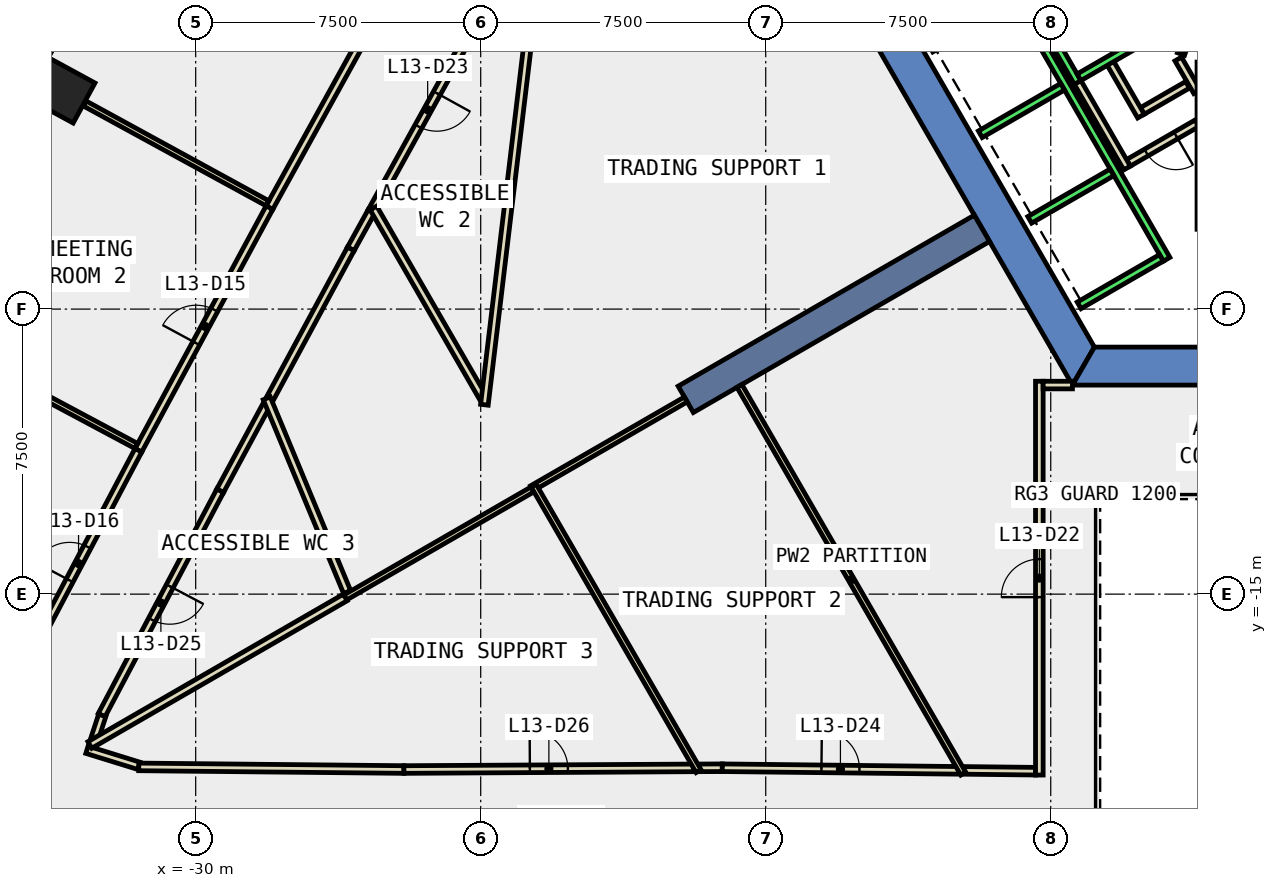
"""IFC4 building model, lengths in metres.
Left out: names, types, materials, properties, quantities, classifications, styles, units other than length and angle.
Written with IfcOpenShell. Run it as: python <this file> out.ifc"""

import sys

from ifc_helpers import new_model, si_unit, direction, frame, frame_2d, origin, origin_2d, place, context, subcontext, project, spatial, polyline, rectangle, outline, extrude, element, fill, save


model = new_model("IFC4")
c1 = context("Model", 3, precision=1e-05, world=origin(), true_north=direction((0.0, 1.0)))
c2 = subcontext(c1, "Body", "Model", "MODEL_VIEW")
j1 = project(units=[si_unit("LENGTHUNIT", "METRE"), si_unit("PLANEANGLEUNIT", "RADIAN")], contexts=[c1])
p1 = place(None, origin())
s1 = spatial("IfcSite", under=j1, at=p1, CompositionType="ELEMENT")
p2 = place(p1, origin())
s2 = spatial("IfcBuilding", under=s1, at=p2, CompositionType="ELEMENT")
p3 = place(p2, frame((0.0, 0.0, 64.4)))
s3 = spatial("IfcBuildingStorey", under=s2, at=p3, CompositionType="ELEMENT", Elevation=64.4)
p4 = place(p3, frame((-33.64, -1.695, -0.4), z_axis=(0.0, 0.0, 1.0), x_axis=(0.478140110514, 0.878283573066, 0.0)))
e1 = element("IfcColumn", 1, at=p4, inside=s3, PredefinedType="COLUMN", context=c2, shape_type="SweptSolid", body=[
    extrude(rectangle(XDim=1.2, YDim=1.6, at=origin_2d()), origin(), (0.0, 0.0, 1.0), 4.2),
])
p5 = place(p3, frame((0.0, 0.0, -0.4)))
e2 = element("IfcWall", 2, at=p5, inside=s3, PredefinedType="SHEAR", context=c2, shape_type="SweptSolid", body=[
    extrude(outline(polyline([(-13.856, 2.5), (-6.928, -9.5), (-6.351, -8.5), (-12.702, 2.5), (-13.856, 2.5)])), origin(), (0.0, 0.0, 1.0), 4.2),
])
p6 = place(p3, frame((0.0, 0.0, -0.4)))
e3 = element("IfcWall", 3, at=p6, inside=s3, PredefinedType="SHEAR", context=c2, shape_type="SweptSolid", body=[
    extrude(outline(polyline([(3.75, -9.5), (3.75, -8.5), (-6.351, -8.5), (-6.928, -9.5), (3.75, -9.5)])), origin(), (0.0, 0.0, 1.0), 4.2),
])
p7 = place(p3, frame((-9.31, -5.375, -0.4), z_axis=(0.0, 0.0, 1.0), x_axis=(-0.866017533419, -0.500013631625, 0.0)))
e4 = element("IfcWall", 4, at=p7, inside=s3, PredefinedType="SHEAR", context=c2, shape_type="SweptSolid", body=[
    extrude(rectangle(XDim=9.0, YDim=0.8, at=frame_2d((4.5, 0.0))), origin(), (0.0, 0.0, 1.0), 4.2),
])
p8 = place(p3, frame((-31.047, 4.549, 0.0), z_axis=(0.0, 0.0, 1.0), x_axis=(-0.483587271547, -0.875296150339, 0.0)))
e5 = element("IfcWall", 5, at=p8, inside=s3, PredefinedType="STANDARD", context=c2, shape_type="SweptSolid", body=[
    extrude(rectangle(XDim=6.125, YDim=0.3, at=frame_2d((3.062, 0.0))), origin(), (0.0, 0.0, 1.0), 3.8),
])
p9 = place(p8, frame((0.531, 0.0, 0.9)))
e6 = element("IfcOpeningElement", 6, at=p9, cuts=e5, PredefinedType="OPENING", context=c2, shape_type="SweptSolid", body=[
    extrude(rectangle(XDim=2.0, YDim=2.6, at=frame_2d((1.0, 1.3))), frame((0.0, 0.16, 0.0), z_axis=(0.0, -1.0, 0.0), x_axis=(1.0, 0.0, 0.0)), (0.0, 0.0, 1.0), 0.32),
])
p10 = place(p8, frame((3.594, 0.0, 0.9)))
e7 = element("IfcOpeningElement", 7, at=p10, cuts=e5, PredefinedType="OPENING", context=c2, shape_type="SweptSolid", body=[
    extrude(rectangle(XDim=2.0, YDim=2.6, at=frame_2d((1.0, 1.3))), frame((0.0, 0.16, 0.0), z_axis=(0.0, -1.0, 0.0), x_axis=(1.0, 0.0, 0.0)), (0.0, 0.0, 1.0), 0.32),
])
p11 = place(p3, frame((-25.371, -4.927, 0.0), z_axis=(0.0, 0.0, 1.0), x_axis=(-0.483899488004, -0.875123582993, 0.0)))
e8 = element("IfcWall", 8, at=p11, inside=s3, PredefinedType="PARTITIONING", context=c2, shape_type="SweptSolid", body=[
    extrude(rectangle(XDim=1.13, YDim=0.2, at=frame_2d((0.565, 0.0))), origin(), (0.0, 0.0, 1.0), 3.8),
])
p12 = place(p3, frame((-25.918, -5.916, 0.0), z_axis=(0.0, 0.0, 1.0), x_axis=(-0.4752384902, -0.879857021016, 0.0)))
e9 = element("IfcWall", 9, at=p12, inside=s3, PredefinedType="PARTITIONING", context=c2, shape_type="SweptSolid", body=[
    extrude(rectangle(XDim=4.473, YDim=0.2, at=frame_2d((2.237, 0.0))), origin(), (0.0, 0.0, 1.0), 3.8),
])
p13 = place(p3, frame((-9.776, -19.638, 0.0), z_axis=(0.0, 0.0, 1.0), x_axis=(0.999937374473, -0.011191386544, 0.0)))
e10 = element("IfcWall", 10, at=p13, inside=s3, PredefinedType="PARTITIONING", context=c2, shape_type="SweptSolid", body=[
    extrude(rectangle(XDim=1.876, YDim=0.2, at=frame_2d((0.938, 0.0))), origin(), (0.0, 0.0, 1.0), 3.8),
])
p14 = place(p3, frame((-22.42, 0.415, 0.0), z_axis=(0.0, 0.0, 1.0), x_axis=(-0.483559496818, -0.875311494861, 0.0)))
e11 = element("IfcWall", 11, at=p14, inside=s3, PredefinedType="PARTITIONING", context=c2, shape_type="SweptSolid", body=[
    extrude(rectangle(XDim=6.103, YDim=0.2, at=frame_2d((3.052, 0.0))), origin(), (0.0, 0.0, 1.0), 3.8),
])
p15 = place(p14, frame((2.552, 0.0, 0.0)))
e12 = element("IfcOpeningElement", 12, at=p15, cuts=e11, PredefinedType="OPENING", context=c2, shape_type="SweptSolid", body=[
    extrude(rectangle(XDim=1.0, YDim=2.1, at=frame_2d((0.5, 1.05))), frame((0.0, 0.11, 0.0), z_axis=(0.0, -1.0, 0.0), x_axis=(1.0, 0.0, 0.0)), (0.0, 0.0, 1.0), 0.22),
])
p16 = place(p3, frame((-16.742, -19.571, 0.0), z_axis=(0.0, 0.0, 1.0), x_axis=(0.999988034534, 0.004891910483, 0.0)))
e13 = element("IfcWall", 13, at=p16, inside=s3, PredefinedType="PARTITIONING", context=c2, shape_type="SweptSolid", body=[
    extrude(rectangle(XDim=0.599, YDim=0.2, at=frame_2d((0.299, 0.0))), origin(), (0.0, 0.0, 1.0), 3.8),
])
p17 = place(p3, frame((-16.143, -19.568, 0.0), z_axis=(0.0, 0.0, 1.0), x_axis=(0.999938688645, -0.011073344206, 0.0)))
e14 = element("IfcWall", 14, at=p17, inside=s3, PredefinedType="PARTITIONING", context=c2, shape_type="SweptSolid", body=[
    extrude(rectangle(XDim=6.218, YDim=0.2, at=frame_2d((3.109, 0.0))), origin(), (0.0, 0.0, 1.0), 3.8),
])
p18 = place(p17, frame((2.609, 0.0, 0.0)))
e15 = element("IfcOpeningElement", 15, at=p18, cuts=e14, PredefinedType="OPENING", context=c2, shape_type="SweptSolid", body=[
    extrude(rectangle(XDim=1.0, YDim=2.1, at=frame_2d((0.5, 1.05))), frame((0.0, 0.11, 0.0), z_axis=(0.0, -1.0, 0.0), x_axis=(1.0, 0.0, 0.0)), (0.0, 0.0, 1.0), 0.22),
])
p19 = place(p3, frame((-28.139, -10.028, 0.0), z_axis=(0.0, 0.0, 1.0), x_axis=(-0.475287687013, -0.879830446491, 0.0)))
e16 = element("IfcWall", 16, at=p19, inside=s3, PredefinedType="PARTITIONING", context=c2, shape_type="SweptSolid", body=[
    extrude(rectangle(XDim=2.561, YDim=0.2, at=frame_2d((1.28, 0.0))), origin(), (0.0, 0.0, 1.0), 3.8),
])
p20 = place(p3, frame((-29.356, -12.281, 0.0), z_axis=(0.0, 0.0, 1.0), x_axis=(-0.467123190417, -0.884192244353, 0.0)))
e17 = element("IfcWall", 17, at=p20, inside=s3, PredefinedType="PARTITIONING", context=c2, shape_type="SweptSolid", body=[
    extrude(rectangle(XDim=6.677, YDim=0.2, at=frame_2d((3.339, 0.0))), origin(), (0.0, 0.0, 1.0), 3.8),
])
p21 = place(p20, frame((2.839, 0.0, 0.0)))
e18 = element("IfcOpeningElement", 18, at=p21, cuts=e17, PredefinedType="OPENING", context=c2, shape_type="SweptSolid", body=[
    extrude(rectangle(XDim=1.0, YDim=2.1, at=frame_2d((0.5, 1.05))), frame((0.0, 0.11, 0.0), z_axis=(0.0, -1.0, 0.0), x_axis=(1.0, 0.0, 0.0)), (0.0, 0.0, 1.0), 0.22),
])
p22 = place(p3, frame((-32.459, -18.191, 0.0), z_axis=(0.0, 0.0, 1.0), x_axis=(-0.312158013001, -0.950030196846, 0.0)))
e19 = element("IfcWall", 19, at=p22, inside=s3, PredefinedType="PARTITIONING", context=c2, shape_type="SweptSolid", body=[
    extrude(rectangle(XDim=0.666, YDim=0.2, at=frame_2d((0.333, 0.0))), origin(), (0.0, 0.0, 1.0), 3.8),
])
p23 = place(p3, frame((-32.861, -19.095, 0.0), z_axis=(0.0, 0.0, 1.0), x_axis=(0.955301951006, -0.29563183591, 0.0)))
e20 = element("IfcWall", 20, at=p23, inside=s3, PredefinedType="PARTITIONING", context=c2, shape_type="SweptSolid", body=[
    extrude(rectangle(XDim=1.431, YDim=0.2, at=frame_2d((0.716, 0.0))), origin(), (0.0, 0.0, 1.0), 3.8),
])
p24 = place(p3, frame((-31.498, -19.546, 0.0), z_axis=(0.0, 0.0, 1.0), x_axis=(0.999950985372, -0.009900851195, 0.0)))
e21 = element("IfcWall", 21, at=p24, inside=s3, PredefinedType="PARTITIONING", context=c2, shape_type="SweptSolid", body=[
    extrude(rectangle(XDim=6.978, YDim=0.2, at=frame_2d((3.489, 0.0))), origin(), (0.0, 0.0, 1.0), 3.8),
])
p25 = place(p3, frame((-24.52, -19.615, 0.0), z_axis=(0.0, 0.0, 1.0), x_axis=(0.999984134574, 0.00563299218, 0.0)))
e22 = element("IfcWall", 22, at=p25, inside=s3, PredefinedType="PARTITIONING", context=c2, shape_type="SweptSolid", body=[
    extrude(rectangle(XDim=7.628, YDim=0.2, at=frame_2d((3.814, 0.0))), origin(), (0.0, 0.0, 1.0), 3.8),
])
p26 = place(p25, frame((3.314, 0.0, 0.0)))
e23 = element("IfcOpeningElement", 23, at=p26, cuts=e22, PredefinedType="OPENING", context=c2, shape_type="SweptSolid", body=[
    extrude(rectangle(XDim=1.0, YDim=2.1, at=frame_2d((0.5, 1.05))), frame((0.0, 0.11, 0.0), z_axis=(0.0, -1.0, 0.0), x_axis=(1.0, 0.0, 0.0)), (0.0, 0.0, 1.0), 0.22),
])
p27 = place(p3, frame((-28.06, -4.831, 0.0), z_axis=(0.0, 0.0, 1.0), x_axis=(0.483631054848, 0.875271959328, 0.0)))
e24 = element("IfcWall", 24, at=p27, inside=s3, PredefinedType="PARTITIONING", context=c2, shape_type="SweptSolid", body=[
    extrude(rectangle(XDim=7.33, YDim=0.2, at=frame_2d((3.665, 0.0))), origin(), (0.0, 0.0, 1.0), 3.8),
])
p28 = place(p3, frame((-31.509, -11.216, 0.0), z_axis=(0.0, 0.0, 1.0), x_axis=(0.475367159168, 0.879787510701, 0.0)))
e25 = element("IfcWall", 25, at=p28, inside=s3, PredefinedType="PARTITIONING", context=c2, shape_type="SweptSolid", body=[
    extrude(rectangle(XDim=7.257, YDim=0.2, at=frame_2d((3.629, 0.0))), origin(), (0.0, 0.0, 1.0), 3.8),
])
p29 = place(p28, frame((3.203, 0.0, 0.0)))
e26 = element("IfcOpeningElement", 26, at=p29, cuts=e25, PredefinedType="OPENING", context=c2, shape_type="SweptSolid", body=[
    extrude(rectangle(XDim=1.0, YDim=2.1, at=frame_2d((0.5, 1.05))), frame((0.0, 0.11, 0.0), z_axis=(0.0, -1.0, 0.0), x_axis=(1.0, 0.0, 0.0)), (0.0, 0.0, 1.0), 0.22),
])
p30 = place(p3, frame((-34.692, -17.243, 0.0), z_axis=(0.0, 0.0, 1.0), x_axis=(0.467102540817, 0.884203153332, 0.0)))
e27 = element("IfcWall", 27, at=p30, inside=s3, PredefinedType="PARTITIONING", context=c2, shape_type="SweptSolid", body=[
    extrude(rectangle(XDim=6.816, YDim=0.2, at=frame_2d((3.408, 0.0))), origin(), (0.0, 0.0, 1.0), 3.8),
])
p31 = place(p30, frame((2.946, 0.0, 0.0)))
e28 = element("IfcOpeningElement", 28, at=p31, cuts=e27, PredefinedType="OPENING", context=c2, shape_type="SweptSolid", body=[
    extrude(rectangle(XDim=1.0, YDim=2.1, at=frame_2d((0.5, 1.05))), frame((0.0, 0.11, 0.0), z_axis=(0.0, -1.0, 0.0), x_axis=(1.0, 0.0, 0.0)), (0.0, 0.0, 1.0), 0.22),
])
p32 = place(p3, frame((-3.9, -1.599, 0.0), z_axis=(0.0, 0.0, 1.0), x_axis=(-0.865969445389, -0.500096910261, 0.0)))
e29 = element("IfcWall", 29, at=p32, inside=s3, PredefinedType="PARTITIONING", context=c2, shape_type="SweptSolid", body=[
    extrude(rectangle(XDim=1.373, YDim=0.2, at=frame_2d((0.687, 0.0))), origin(), (0.0, 0.0, 1.0), 3.8),
])
p33 = place(p3, frame((-5.126, -2.422, 0.0), z_axis=(0.0, 0.0, 1.0), x_axis=(-0.500062241894, 0.865989465428, 0.0)))
e30 = element("IfcWall", 30, at=p33, inside=s3, PredefinedType="PARTITIONING", context=c2, shape_type="SweptSolid", body=[
    extrude(rectangle(XDim=1.7, YDim=0.2, at=frame_2d((0.85, 0.0))), origin(), (0.0, 0.0, 1.0), 3.8),
])
p34 = place(p3, frame((-3.65, -2.61, 0.0), z_axis=(0.0, 0.0, 1.0), x_axis=(-0.866072462134, -0.499918483688, 0.0)))
e31 = element("IfcWall", 31, at=p34, inside=s3, PredefinedType="PARTITIONING", context=c2, shape_type="SweptSolid", body=[
    extrude(rectangle(XDim=2.084, YDim=0.2, at=frame_2d((1.042, 0.0))), origin(), (0.0, 0.0, 1.0), 3.8),
])
p35 = place(p34, frame((0.642, 0.0, 0.0)))
e32 = element("IfcOpeningElement", 32, at=p35, cuts=e31, PredefinedType="OPENING", context=c2, shape_type="SweptSolid", body=[
    extrude(rectangle(XDim=0.9, YDim=2.1, at=frame_2d((0.45, 1.05))), frame((0.0, 0.11, 0.0), z_axis=(0.0, -1.0, 0.0), x_axis=(1.0, 0.0, 0.0)), (0.0, 0.0, 1.0), 0.22),
])
p36 = place(p3, frame((-5.492, -3.788, 0.0), z_axis=(0.0, 0.0, 1.0), x_axis=(-0.500008949224, 0.866020236886, 0.0)))
e33 = element("IfcWall", 33, at=p36, inside=s3, PredefinedType="PARTITIONING", context=c2, shape_type="SweptSolid", body=[
    extrude(rectangle(XDim=2.68, YDim=0.2, at=frame_2d((1.34, 0.0))), origin(), (0.0, 0.0, 1.0), 3.8),
])
p37 = place(p3, frame((-4.145, -0.92, 0.0), z_axis=(0.0, 0.0, 1.0), x_axis=(0.499743786207, -0.866173278362, 0.0)))
e34 = element("IfcWall", 34, at=p37, inside=s3, PredefinedType="PARTITIONING", context=c2, shape_type="SweptSolid", body=[
    extrude(rectangle(XDim=0.991, YDim=0.2, at=frame_2d((0.495, 0.0))), origin(), (0.0, 0.0, 1.0), 3.8),
])
p38 = place(p3, frame((-3.96, -0.47, 0.0), z_axis=(0.0, 0.0, 1.0), x_axis=(-0.334824194261, -0.942280615813, 0.0)))
e35 = element("IfcWall", 35, at=p38, inside=s3, PredefinedType="PARTITIONING", context=c2, shape_type="SweptSolid", body=[
    extrude(rectangle(XDim=0.338, YDim=0.2, at=frame_2d((0.169, 0.0))), origin(), (0.0, 0.0, 1.0), 3.8),
])
p39 = place(p3, frame((-7.8, -19.76, 0.0), z_axis=(0.0, 0.0, 1.0), x_axis=(0.0, 1.0, 0.0)))
e36 = element("IfcWall", 36, at=p39, inside=s3, PredefinedType="PARTITIONING", context=c2, shape_type="SweptSolid", body=[
    extrude(rectangle(XDim=10.361, YDim=0.2, at=frame_2d((5.181, 0.0))), origin(), (0.0, 0.0, 1.0), 3.8),
])
p40 = place(p39, frame((4.681, 0.0, 0.0)))
e37 = element("IfcOpeningElement", 37, at=p40, cuts=e36, PredefinedType="OPENING", context=c2, shape_type="SweptSolid", body=[
    extrude(rectangle(XDim=1.0, YDim=2.1, at=frame_2d((0.5, 1.05))), frame((0.0, 0.11, 0.0), z_axis=(0.0, -1.0, 0.0), x_axis=(1.0, 0.0, 0.0)), (0.0, 0.0, 1.0), 0.22),
])
p41 = place(p3, frame((-7.7, -9.499, 0.0), z_axis=(0.0, 0.0, 1.0), x_axis=(1.0, 0.0, 0.0)))
e38 = element("IfcWall", 38, at=p41, inside=s3, PredefinedType="PARTITIONING", context=c2, shape_type="SweptSolid", body=[
    extrude(rectangle(XDim=0.771, YDim=0.2, at=frame_2d((0.385, 0.0))), origin(), (0.0, 0.0, 1.0), 3.8),
])
p42 = place(p3, frame((-25.323, -4.84, 0.0), z_axis=(0.0, 0.0, 1.0), x_axis=(0.500070797646, -0.865984524886, 0.0)))
e39 = element("IfcWall", 39, at=p42, inside=s3, PredefinedType="PARTITIONING", context=c2, shape_type="SweptSolid", body=[
    extrude(rectangle(XDim=5.763, YDim=0.2, at=frame_2d((2.882, 0.0))), origin(), (0.0, 0.0, 1.0), 3.8),
])
p43 = place(p3, frame((-22.403, -10.017, 0.0), z_axis=(0.0, 0.0, 1.0), x_axis=(0.119143334217, 0.992877064853, 0.0)))
e40 = element("IfcWall", 40, at=p43, inside=s3, PredefinedType="PARTITIONING", context=c2, shape_type="SweptSolid", body=[
    extrude(rectangle(XDim=10.207, YDim=0.2, at=frame_2d((5.104, 0.0))), origin(), (0.0, 0.0, 1.0), 3.8),
])
p44 = place(p3, frame((-9.801, -19.724, 0.0), z_axis=(0.0, 0.0, 1.0), x_axis=(-0.500005867738, 0.866022016018, 0.0)))
e41 = element("IfcWall", 41, at=p44, inside=s3, PredefinedType="PARTITIONING", context=c2, shape_type="SweptSolid", body=[
    extrude(rectangle(XDim=11.781, YDim=0.15, at=frame_2d((5.891, 0.0))), origin(), (0.0, 0.0, 1.0), 3.8),
])
p45 = place(p3, frame((-17.103, -9.878, 0.0), z_axis=(0.0, 0.0, 1.0), x_axis=(-0.866013358989, -0.500020861617, 0.0)))
e42 = element("IfcWall", 42, at=p45, inside=s3, PredefinedType="PARTITIONING", context=c2, shape_type="SweptSolid", body=[
    extrude(rectangle(XDim=4.674, YDim=0.15, at=frame_2d((2.337, 0.0))), origin(), (0.0, 0.0, 1.0), 3.8),
])
p46 = place(p3, frame((-26.015, -14.946, 0.0), z_axis=(0.0, 0.0, 1.0), x_axis=(-0.383189005855, 0.923669955012, 0.0)))
e43 = element("IfcWall", 43, at=p46, inside=s3, PredefinedType="PARTITIONING", context=c2, shape_type="SweptSolid", body=[
    extrude(rectangle(XDim=5.52, YDim=0.2, at=frame_2d((2.76, 0.0))), origin(), (0.0, 0.0, 1.0), 3.8),
])
p47 = place(p3, frame((-21.135, -12.243, 0.0), z_axis=(0.0, 0.0, 1.0), x_axis=(-0.866083439347, -0.499899465982, 0.0)))
e44 = element("IfcWall", 44, at=p47, inside=s3, PredefinedType="PARTITIONING", context=c2, shape_type="SweptSolid", body=[
    extrude(rectangle(XDim=5.691, YDim=0.15, at=frame_2d((2.846, 0.0))), origin(), (0.0, 0.0, 1.0), 3.8),
])
p48 = place(p3, frame((-16.767, -19.658, 0.0), z_axis=(0.0, 0.0, 1.0), x_axis=(-0.500083586486, 0.865977139726, 0.0)))
e45 = element("IfcWall", 45, at=p48, inside=s3, PredefinedType="PARTITIONING", context=c2, shape_type="SweptSolid", body=[
    extrude(rectangle(XDim=8.68, YDim=0.15, at=frame_2d((4.34, 0.0))), origin(), (0.0, 0.0, 1.0), 3.8),
])
p49 = place(p3, frame((-26.064, -15.088, 0.0), z_axis=(0.0, 0.0, 1.0), x_axis=(-0.865982841629, -0.500073712571, 0.0)))
e46 = element("IfcWall", 46, at=p49, inside=s3, PredefinedType="PARTITIONING", context=c2, shape_type="SweptSolid", body=[
    extrude(rectangle(XDim=7.761, YDim=0.2, at=frame_2d((3.88, 0.0))), origin(), (0.0, 0.0, 1.0), 3.8),
])
p50 = place(p3, frame((-28.111, -4.717, 0.0), z_axis=(0.0, 0.0, 1.0), x_axis=(-0.877558297547, 0.479469951515, 0.0)))
e47 = element("IfcWall", 47, at=p50, inside=s3, PredefinedType="PARTITIONING", context=c2, shape_type="SweptSolid", body=[
    extrude(rectangle(XDim=5.481, YDim=0.15, at=frame_2d((2.74, 0.0))), origin(), (0.0, 0.0, 1.0), 3.8),
])
p51 = place(p3, frame((-31.561, -11.103, 0.0), z_axis=(0.0, 0.0, 1.0), x_axis=(-0.882056805494, 0.47114306944, 0.0)))
e48 = element("IfcWall", 48, at=p51, inside=s3, PredefinedType="PARTITIONING", context=c2, shape_type="SweptSolid", body=[
    extrude(rectangle(XDim=5.48, YDim=0.15, at=frame_2d((2.74, 0.0))), origin(), (0.0, 0.0, 1.0), 3.8),
])
p52 = place(p3, frame((-8.192, 0.888, 0.0), z_axis=(0.0, 0.0, 1.0), x_axis=(0.49994636267, -0.866056369097, 0.0)))
e49 = element("IfcWall", 49, at=p52, inside=s3, PredefinedType="STANDARD", context=c2, shape_type="SweptSolid", body=[
    extrude(rectangle(XDim=2.8, YDim=0.2, at=frame_2d((1.4, 0.0))), origin(), (0.0, 0.0, 1.0), 3.8),
])
p53 = place(p3, frame((-4.677, -0.2, 0.0), z_axis=(0.0, 0.0, 1.0), x_axis=(-0.865973769406, -0.500089422704, 0.0)))
e50 = element("IfcWall", 50, at=p53, inside=s3, PredefinedType="STANDARD", context=c2, shape_type="SweptSolid", body=[
    extrude(rectangle(XDim=2.399, YDim=0.2, at=frame_2d((1.2, 0.0))), origin(), (0.0, 0.0, 1.0), 3.8),
])
p54 = place(p3, frame((-9.751, 2.99, 0.0), z_axis=(0.0, 0.0, 1.0), x_axis=(0.50000090737, -0.866024879913, 0.0)))
e51 = element("IfcWall", 51, at=p54, inside=s3, PredefinedType="STANDARD", context=c2, shape_type="SweptSolid", body=[
    extrude(rectangle(XDim=10.6, YDim=0.2, at=frame_2d((5.3, 0.0))), origin(), (0.0, 0.0, 1.0), 3.8),
])
for number, where, z_axis, x_axis in (
    (52, (-7.188, -1.65, 0.0), (0.0, 0.0, 1.0), (-0.866, -0.5, 0.0)),
    (53, (-5.888, -3.902, 0.0), (0.0, 0.0, 1.0), (-0.866, -0.5, 0.0)),
    (54, (-4.588, -6.153, 0.0), (0.0, 0.0, 1.0), (-0.866, -0.5, 0.0)),
):
    element("IfcWall", number, at=place(p3, frame(where, z_axis=z_axis, x_axis=x_axis)), inside=s3, PredefinedType="STANDARD", context=c2, shape_type="SweptSolid", body=[
        extrude(rectangle(XDim=2.5, YDim=0.2, at=frame_2d((1.25, 0.0))), origin(), (0.0, 0.0, 1.0), 3.8),
    ])
p55 = place(p3, frame((-3.55, -1.0, 0.0), z_axis=(0.0, 0.0, 1.0), x_axis=(0.0, -1.0, 0.0)))
e55 = element("IfcWall", 55, at=p55, inside=s3, PredefinedType="STANDARD", context=c2, shape_type="SweptSolid", body=[
    extrude(rectangle(XDim=4.4, YDim=0.2, at=frame_2d((2.2, 0.0))), origin(), (0.0, 0.0, 1.0), 3.8),
])
p56 = place(p55, frame((1.65, 0.0, 0.0)))
e56 = element("IfcOpeningElement", 56, at=p56, cuts=e55, PredefinedType="OPENING", context=c2, shape_type="SweptSolid", body=[
    extrude(rectangle(XDim=1.1, YDim=2.2, at=frame_2d((0.55, 1.1))), frame((0.0, 0.11, 0.0), z_axis=(0.0, -1.0, 0.0), x_axis=(1.0, 0.0, 0.0)), (0.0, 0.0, 1.0), 0.22),
])
p57 = place(p29, origin())
e57 = element("IfcDoor", 57, at=p57, inside=s3, OperationType="SINGLE_SWING_RIGHT", PredefinedType="DOOR", context=c2, shape_type="SweptSolid", body=[
    extrude(rectangle(XDim=1.0, YDim=2.1, at=frame_2d((0.5, 1.05))), frame((0.0, 0.025, 0.0), z_axis=(0.0, -1.0, 0.0), x_axis=(1.0, 0.0, 0.0)), (0.0, 0.0, 1.0), 0.05),
])
fill(e26, e57)
p58 = place(p31, origin())
e58 = element("IfcDoor", 58, at=p58, inside=s3, OperationType="SINGLE_SWING_LEFT", PredefinedType="DOOR", context=c2, shape_type="SweptSolid", body=[
    extrude(rectangle(XDim=1.0, YDim=2.1, at=frame_2d((0.5, 1.05))), frame((0.0, 0.025, 0.0), z_axis=(0.0, -1.0, 0.0), x_axis=(1.0, 0.0, 0.0)), (0.0, 0.0, 1.0), 0.05),
])
fill(e28, e58)
p59 = place(p40, origin())
e59 = element("IfcDoor", 59, at=p59, inside=s3, OperationType="SINGLE_SWING_LEFT", PredefinedType="DOOR", context=c2, shape_type="SweptSolid", body=[
    extrude(rectangle(XDim=1.0, YDim=2.1, at=frame_2d((0.5, 1.05))), frame((0.0, 0.025, 0.0), z_axis=(0.0, -1.0, 0.0), x_axis=(1.0, 0.0, 0.0)), (0.0, 0.0, 1.0), 0.05),
])
fill(e37, e59)
p60 = place(p15, origin())
e60 = element("IfcDoor", 60, at=p60, inside=s3, OperationType="SINGLE_SWING_LEFT", PredefinedType="DOOR", context=c2, shape_type="SweptSolid", body=[
    extrude(rectangle(XDim=1.0, YDim=2.1, at=frame_2d((0.5, 1.05))), frame((0.0, 0.025, 0.0), z_axis=(0.0, -1.0, 0.0), x_axis=(1.0, 0.0, 0.0)), (0.0, 0.0, 1.0), 0.05),
])
fill(e12, e60)
p61 = place(p18, origin())
e61 = element("IfcDoor", 61, at=p61, inside=s3, OperationType="SINGLE_SWING_LEFT", PredefinedType="DOOR", context=c2, shape_type="SweptSolid", body=[
    extrude(rectangle(XDim=1.0, YDim=2.1, at=frame_2d((0.5, 1.05))), frame((0.0, 0.025, 0.0), z_axis=(0.0, -1.0, 0.0), x_axis=(1.0, 0.0, 0.0)), (0.0, 0.0, 1.0), 0.05),
])
fill(e15, e61)
p62 = place(p21, origin())
e62 = element("IfcDoor", 62, at=p62, inside=s3, OperationType="SINGLE_SWING_LEFT", PredefinedType="DOOR", context=c2, shape_type="SweptSolid", body=[
    extrude(rectangle(XDim=1.0, YDim=2.1, at=frame_2d((0.5, 1.05))), frame((0.0, 0.025, 0.0), z_axis=(0.0, -1.0, 0.0), x_axis=(1.0, 0.0, 0.0)), (0.0, 0.0, 1.0), 0.05),
])
fill(e18, e62)
p63 = place(p26, origin())
e63 = element("IfcDoor", 63, at=p63, inside=s3, OperationType="SINGLE_SWING_LEFT", PredefinedType="DOOR", context=c2, shape_type="SweptSolid", body=[
    extrude(rectangle(XDim=1.0, YDim=2.1, at=frame_2d((0.5, 1.05))), frame((0.0, 0.025, 0.0), z_axis=(0.0, -1.0, 0.0), x_axis=(1.0, 0.0, 0.0)), (0.0, 0.0, 1.0), 0.05),
])
fill(e23, e63)
p64 = place(p35, origin())
e64 = element("IfcDoor", 64, at=p64, inside=s3, OperationType="SINGLE_SWING_LEFT", PredefinedType="DOOR", context=c2, shape_type="SweptSolid", body=[
    extrude(rectangle(XDim=0.9, YDim=2.1, at=frame_2d((0.45, 1.05))), frame((0.0, 0.025, 0.0), z_axis=(0.0, -1.0, 0.0), x_axis=(1.0, 0.0, 0.0)), (0.0, 0.0, 1.0), 0.05),
])
fill(e32, e64)
save(model, sys.argv[1])
